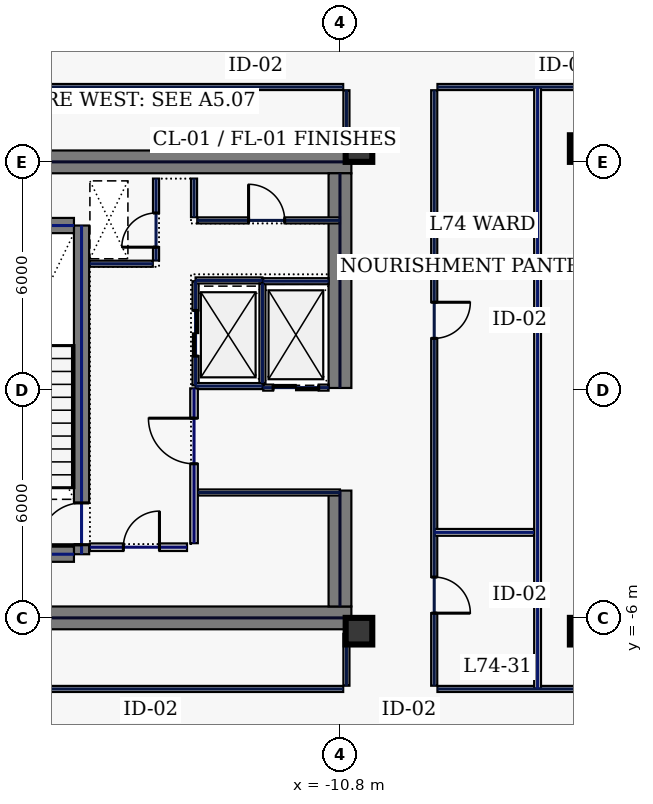
"""IFC4 building model, lengths in metres.
Left out: names, types, materials, properties, quantities, classifications, styles, units other than length and angle.
Written with IfcOpenShell. Run it as: python <this file> out.ifc"""

import sys

from ifc_helpers import new_model, si_unit, direction, frame, frame_2d, origin, origin_2d, place, context, subcontext, project, spatial, rectangle, hollow_rectangle, extrude, element, fill, save


model = new_model("IFC4")
c1 = context("Model", 3, precision=1e-05, world=origin(), true_north=direction((0.0, 1.0)))
c2 = subcontext(c1, "Body", "Model", "MODEL_VIEW")
j1 = project(units=[si_unit("LENGTHUNIT", "METRE"), si_unit("PLANEANGLEUNIT", "RADIAN")], contexts=[c1])
p1 = place(None, origin())
s1 = spatial("IfcSite", under=j1, at=p1, CompositionType="ELEMENT")
p2 = place(p1, origin())
s2 = spatial("IfcBuilding", under=s1, at=p2, CompositionType="ELEMENT")
p3 = place(p2, frame((0.0, 0.0, 317.0)))
s3 = spatial("IfcBuildingStorey", under=s2, at=p3, CompositionType="ELEMENT", Elevation=317.0)
for number, where, z_axis, x_axis in (
    (1, (-22.0, 6.0, 0.0), (0.0, 0.0, 1.0), (1.0, 0.0, 0.0)),
    (2, (-22.0, -6.0, 0.0), (0.0, 0.0, 1.0), (1.0, 0.0, 0.0)),
):
    element("IfcWall", number, at=place(p3, frame(where, z_axis=z_axis, x_axis=x_axis)), inside=s3, PredefinedType="SHEAR", context=c2, shape_type="SweptSolid", body=[
        extrude(rectangle(XDim=11.5, YDim=0.6, at=frame_2d((5.75, 0.0))), origin(), (0.0, 0.0, 1.0), 3.74),
    ])
p4 = place(p3, frame((-10.8, -5.7, 0.0), z_axis=(0.0, 0.0, 1.0), x_axis=(0.0, 1.0, 0.0)))
e3 = element("IfcWall", 3, at=p4, inside=s3, PredefinedType="SHEAR", context=c2, shape_type="SweptSolid", body=[
    extrude(rectangle(XDim=3.05, YDim=0.6, at=frame_2d((1.525, 0.0))), origin(), (0.0, 0.0, 1.0), 3.74),
])
p5 = place(p3, frame((-10.8, 0.05, 0.0), z_axis=(0.0, 0.0, 1.0), x_axis=(0.0, 1.0, 0.0)))
e4 = element("IfcWall", 4, at=p5, inside=s3, PredefinedType="SHEAR", context=c2, shape_type="SweptSolid", body=[
    extrude(rectangle(XDim=5.65, YDim=0.6, at=frame_2d((2.825, 0.0))), origin(), (0.0, 0.0, 1.0), 3.74),
])
p6 = place(p3, frame((-17.6, -4.325, 0.0), z_axis=(0.0, 0.0, 1.0), x_axis=(0.0, 1.0, 0.0)))
e5 = element("IfcWall", 5, at=p6, inside=s3, PredefinedType="SHEAR", context=c2, shape_type="SweptSolid", body=[
    extrude(rectangle(XDim=8.65, YDim=0.4, at=frame_2d((4.325, 0.0))), origin(), (0.0, 0.0, 1.0), 3.74),
])
p7 = place(p6, frame((0.25, 0.0, 0.0)))
e6 = element("IfcOpeningElement", 6, at=p7, cuts=e5, PredefinedType="OPENING", context=c2, shape_type="SweptSolid", body=[
    extrude(rectangle(XDim=1.1, YDim=2.2, at=frame_2d((0.55, 1.1))), frame((0.0, 0.21, 0.0), z_axis=(0.0, -1.0, 0.0), x_axis=(1.0, 0.0, 0.0)), (0.0, 0.0, 1.0), 0.42),
])
for number, where, z_axis, x_axis in (
    (7, (-21.2, -4.325, 0.0), (0.0, 0.0, 1.0), (1.0, 0.0, 0.0)),
    (8, (-21.2, 4.325, 0.0), (0.0, 0.0, 1.0), (1.0, 0.0, 0.0)),
):
    element("IfcWall", number, at=place(p3, frame(where, z_axis=z_axis, x_axis=x_axis)), inside=s3, PredefinedType="SHEAR", context=c2, shape_type="SweptSolid", body=[
        extrude(rectangle(XDim=3.4, YDim=0.4, at=frame_2d((1.7, 0.0))), origin(), (0.0, 0.0, 1.0), 3.74),
    ])
for number, where, z_axis, x_axis in (
    (9, (-10.3, -6.35, 0.0), (0.0, 0.0, 1.0), (1.0, 0.0, 0.0)),
    (10, (-10.3, 6.35, 0.0), (0.0, 0.0, 1.0), (1.0, 0.0, 0.0)),
    (11, (-4.4, -6.35, 0.0), (0.0, 0.0, 1.0), (1.0, 0.0, 0.0)),
    (12, (-4.4, 6.35, 0.0), (0.0, 0.0, 1.0), (1.0, 0.0, 0.0)),
):
    element("IfcColumn", number, at=place(p3, frame(where, z_axis=z_axis, x_axis=x_axis)), inside=s3, PredefinedType="COLUMN", context=c2, shape_type="SweptSolid", body=[
        extrude(hollow_rectangle(XDim=0.7, YDim=0.7, WallThickness=0.032, at=origin_2d()), origin(), (0.0, 0.0, 1.0), 3.74),
    ])
p8 = place(p3, frame((-14.6, 0.12, 0.0), z_axis=(0.0, 0.0, 1.0), x_axis=(0.0, 1.0, 0.0)))
e13 = element("IfcWall", 13, at=p8, inside=s3, PredefinedType="PARTITIONING", context=c2, shape_type="SweptSolid", body=[
    extrude(rectangle(XDim=2.74, YDim=0.16, at=frame_2d((1.37, 0.0))), origin(), (0.0, 0.0, 1.0), 3.74),
])
p9 = place(p8, frame((0.77, 0.0, 0.0)))
e14 = element("IfcOpeningElement", 14, at=p9, cuts=e13, PredefinedType="OPENING", context=c2, shape_type="SweptSolid", body=[
    extrude(rectangle(XDim=1.2, YDim=2.2, at=frame_2d((0.6, 1.1))), frame((0.0, 0.09, 0.0), z_axis=(0.0, -1.0, 0.0), x_axis=(1.0, 0.0, 0.0)), (0.0, 0.0, 1.0), 0.18),
])
for number, where, z_axis, x_axis in (
    (15, (-14.6, 0.1, 0.0), (0.0, 0.0, 1.0), (1.0, 0.0, 0.0)),
    (16, (-14.6, 2.88, 0.0), (0.0, 0.0, 1.0), (1.0, 0.0, 0.0)),
):
    element("IfcWall", number, at=place(p3, frame(where, z_axis=z_axis, x_axis=x_axis)), inside=s3, PredefinedType="PARTITIONING", context=c2, shape_type="SweptSolid", body=[
        extrude(rectangle(XDim=1.76, YDim=0.16, at=frame_2d((0.88, 0.0))), origin(), (0.0, 0.0, 1.0), 3.74),
    ])
p10 = place(p3, frame((-12.84, 0.18, 0.0), z_axis=(0.0, 0.0, 1.0), x_axis=(0.0, 1.0, 0.0)))
e17 = element("IfcWall", 17, at=p10, inside=s3, PredefinedType="PARTITIONING", context=c2, shape_type="SweptSolid", body=[
    extrude(rectangle(XDim=2.62, YDim=0.16, at=frame_2d((1.31, 0.0))), origin(), (0.0, 0.0, 1.0), 3.74),
])
p11 = place(p3, frame((-12.82, 0.06, 0.0), z_axis=(0.0, 0.0, 1.0), x_axis=(1.0, 0.0, 0.0)))
e18 = element("IfcWall", 18, at=p11, inside=s3, PredefinedType="PARTITIONING", context=c2, shape_type="SweptSolid", body=[
    extrude(rectangle(XDim=1.72, YDim=0.16, at=frame_2d((0.86, 0.0))), origin(), (0.0, 0.0, 1.0), 3.74),
])
p12 = place(p11, frame((0.26, 0.0, 0.0)))
e19 = element("IfcOpeningElement", 19, at=p12, cuts=e18, PredefinedType="OPENING", context=c2, shape_type="SweptSolid", body=[
    extrude(rectangle(XDim=1.2, YDim=2.2, at=frame_2d((0.6, 1.1))), frame((0.0, 0.09, 0.0), z_axis=(0.0, -1.0, 0.0), x_axis=(1.0, 0.0, 0.0)), (0.0, 0.0, 1.0), 0.18),
])
p13 = place(p3, frame((-12.82, 2.86, 0.0), z_axis=(0.0, 0.0, 1.0), x_axis=(1.0, 0.0, 0.0)))
e20 = element("IfcWall", 20, at=p13, inside=s3, PredefinedType="PARTITIONING", context=c2, shape_type="SweptSolid", body=[
    extrude(rectangle(XDim=1.72, YDim=0.16, at=frame_2d((0.86, 0.0))), origin(), (0.0, 0.0, 1.0), 3.74),
])
p14 = place(p3, frame((-15.64, 3.405, 0.0), z_axis=(0.0, 0.0, 1.0), x_axis=(0.0, 1.0, 0.0)))
e21 = element("IfcWall", 21, at=p14, inside=s3, PredefinedType="PARTITIONING", context=c2, shape_type="SweptSolid", body=[
    extrude(rectangle(XDim=2.155, YDim=0.16, at=frame_2d((1.078, 0.0))), origin(), (0.0, 0.0, 1.0), 3.74),
])
p15 = place(p14, frame((0.35, 0.0, 0.0)))
e22 = element("IfcOpeningElement", 22, at=p15, cuts=e21, PredefinedType="OPENING", context=c2, shape_type="SweptSolid", body=[
    extrude(rectangle(XDim=0.9, YDim=2.2, at=frame_2d((0.45, 1.1))), frame((0.0, 0.09, 0.0), z_axis=(0.0, -1.0, 0.0), x_axis=(1.0, 0.0, 0.0)), (0.0, 0.0, 1.0), 0.18),
])
p16 = place(p3, frame((-17.38, 3.32, 0.0), z_axis=(0.0, 0.0, 1.0), x_axis=(1.0, 0.0, 0.0)))
e23 = element("IfcWall", 23, at=p16, inside=s3, PredefinedType="PARTITIONING", context=c2, shape_type="SweptSolid", body=[
    extrude(rectangle(XDim=1.655, YDim=0.16, at=frame_2d((0.827, 0.0))), origin(), (0.0, 0.0, 1.0), 3.74),
])
p17 = place(p3, frame((-17.38, -4.14, 0.0), z_axis=(0.0, 0.0, 1.0), x_axis=(1.0, 0.0, 0.0)))
e24 = element("IfcWall", 24, at=p17, inside=s3, PredefinedType="SOLIDWALL", context=c2, shape_type="SweptSolid", body=[
    extrude(rectangle(XDim=2.555, YDim=0.2, at=frame_2d((1.277, 0.0))), origin(), (0.0, 0.0, 1.0), 3.74),
])
p18 = place(p17, frame((0.88, 0.0, 0.0)))
e25 = element("IfcOpeningElement", 25, at=p18, cuts=e24, PredefinedType="OPENING", context=c2, shape_type="SweptSolid", body=[
    extrude(rectangle(XDim=0.95, YDim=2.2, at=frame_2d((0.475, 1.1))), frame((0.0, 0.11, 0.0), z_axis=(0.0, -1.0, 0.0), x_axis=(1.0, 0.0, 0.0)), (0.0, 0.0, 1.0), 0.22),
])
p19 = place(p3, frame((-14.535, -2.7, 0.0), z_axis=(0.0, 0.0, 1.0), x_axis=(1.0, 0.0, 0.0)))
e26 = element("IfcWall", 26, at=p19, inside=s3, PredefinedType="PARTITIONING", context=c2, shape_type="SweptSolid", body=[
    extrude(rectangle(XDim=3.735, YDim=0.16, at=frame_2d((1.867, 0.0))), origin(), (0.0, 0.0, 1.0), 3.74),
])
p20 = place(p3, frame((-14.555, 4.46, 0.0), z_axis=(0.0, 0.0, 1.0), x_axis=(1.0, 0.0, 0.0)))
e27 = element("IfcWall", 27, at=p20, inside=s3, PredefinedType="PARTITIONING", context=c2, shape_type="SweptSolid", body=[
    extrude(rectangle(XDim=3.755, YDim=0.16, at=frame_2d((1.877, 0.0))), origin(), (0.0, 0.0, 1.0), 3.74),
])
p21 = place(p20, frame((1.35, 0.0, 0.0)))
e28 = element("IfcOpeningElement", 28, at=p21, cuts=e27, PredefinedType="OPENING", context=c2, shape_type="SweptSolid", body=[
    extrude(rectangle(XDim=0.95, YDim=2.2, at=frame_2d((0.475, 1.1))), frame((0.0, 0.09, 0.0), z_axis=(0.0, -1.0, 0.0), x_axis=(1.0, 0.0, 0.0)), (0.0, 0.0, 1.0), 0.18),
])
p22 = place(p3, frame((-14.64, 4.545, 0.0), z_axis=(0.0, 0.0, 1.0), x_axis=(0.0, 1.0, 0.0)))
e29 = element("IfcWall", 29, at=p22, inside=s3, PredefinedType="PARTITIONING", context=c2, shape_type="SweptSolid", body=[
    extrude(rectangle(XDim=1.015, YDim=0.16, at=frame_2d((0.508, 0.0))), origin(), (0.0, 0.0, 1.0), 3.74),
])
p23 = place(p3, frame((-14.64, -4.035, 0.0), z_axis=(0.0, 0.0, 1.0), x_axis=(0.0, 1.0, 0.0)))
e30 = element("IfcWall", 30, at=p23, inside=s3, PredefinedType="SOLIDWALL", context=c2, shape_type="SweptSolid", body=[
    extrude(rectangle(XDim=4.075, YDim=0.2, at=frame_2d((2.038, 0.0))), origin(), (0.0, 0.0, 1.0), 3.74),
])
p24 = place(p23, frame((2.09, 0.0, 0.0)))
e31 = element("IfcOpeningElement", 31, at=p24, cuts=e30, PredefinedType="OPENING", context=c2, shape_type="SweptSolid", body=[
    extrude(rectangle(XDim=1.2, YDim=2.2, at=frame_2d((0.6, 1.1))), frame((0.0, 0.11, 0.0), z_axis=(0.0, -1.0, 0.0), x_axis=(1.0, 0.0, 0.0)), (0.0, 0.0, 1.0), 0.22),
])
p25 = place(p3, frame((-3.965, 7.97, 0.0), z_axis=(0.0, 0.0, 1.0), x_axis=(-1.0, 0.0, 0.0)))
e32 = element("IfcWall", 32, at=p25, inside=s3, PredefinedType="PARTITIONING", context=c2, shape_type="SweptSolid", body=[
    extrude(rectangle(XDim=4.27, YDim=0.16, at=frame_2d((2.135, 0.0))), origin(), (0.0, 0.0, 1.0), 3.74),
])
p26 = place(p3, frame((-8.32, 7.885, 0.0), z_axis=(0.0, 0.0, 1.0), x_axis=(0.0, -1.0, 0.0)))
e33 = element("IfcWall", 33, at=p26, inside=s3, PredefinedType="PARTITIONING", context=c2, shape_type="SweptSolid", body=[
    extrude(rectangle(XDim=15.67, YDim=0.16, at=frame_2d((7.835, 0.0))), origin(), (0.0, 0.0, 1.0), 3.74),
])
p27 = place(p26, frame((12.811, 0.0, 0.0)))
e34 = element("IfcOpeningElement", 34, at=p27, cuts=e33, PredefinedType="OPENING", context=c2, shape_type="SweptSolid", body=[
    extrude(rectangle(XDim=0.95, YDim=2.2, at=frame_2d((0.475, 1.1))), frame((0.0, 0.09, 0.0), z_axis=(0.0, -1.0, 0.0), x_axis=(1.0, 0.0, 0.0)), (0.0, 0.0, 1.0), 0.18),
])
p28 = place(p26, frame((5.579, 0.0, 0.0)))
e35 = element("IfcOpeningElement", 35, at=p28, cuts=e33, PredefinedType="OPENING", context=c2, shape_type="SweptSolid", body=[
    extrude(rectangle(XDim=0.95, YDim=2.2, at=frame_2d((0.475, 1.1))), frame((0.0, 0.09, 0.0), z_axis=(0.0, -1.0, 0.0), x_axis=(1.0, 0.0, 0.0)), (0.0, 0.0, 1.0), 0.18),
])
p29 = place(p3, frame((-8.235, -7.87, 0.0), z_axis=(0.0, 0.0, 1.0), x_axis=(1.0, 0.0, 0.0)))
e36 = element("IfcWall", 36, at=p29, inside=s3, PredefinedType="PARTITIONING", context=c2, shape_type="SweptSolid", body=[
    extrude(rectangle(XDim=4.27, YDim=0.16, at=frame_2d((2.135, 0.0))), origin(), (0.0, 0.0, 1.0), 3.74),
])
p30 = place(p3, frame((-10.63, -7.785, 0.0), z_axis=(0.0, 0.0, 1.0), x_axis=(0.0, 1.0, 0.0)))
e37 = element("IfcWall", 37, at=p30, inside=s3, PredefinedType="PARTITIONING", context=c2, shape_type="SweptSolid", body=[
    extrude(rectangle(XDim=1.365, YDim=0.16, at=frame_2d((0.683, 0.0))), origin(), (0.0, 0.0, 1.0), 3.74),
])
p31 = place(p3, frame((-10.63, 6.42, 0.0), z_axis=(0.0, 0.0, 1.0), x_axis=(0.0, 1.0, 0.0)))
e38 = element("IfcWall", 38, at=p31, inside=s3, PredefinedType="PARTITIONING", context=c2, shape_type="SweptSolid", body=[
    extrude(rectangle(XDim=1.465, YDim=0.16, at=frame_2d((0.732, 0.0))), origin(), (0.0, 0.0, 1.0), 3.74),
])
for number, where, z_axis, x_axis in (
    (39, (-10.715, 7.97, 0.0), (0.0, 0.0, 1.0), (-1.0, 0.0, 0.0)),
    (40, (-21.915, -7.87, 0.0), (0.0, 0.0, 1.0), (1.0, 0.0, 0.0)),
):
    element("IfcWall", number, at=place(p3, frame(where, z_axis=z_axis, x_axis=x_axis)), inside=s3, PredefinedType="PARTITIONING", context=c2, shape_type="SweptSolid", body=[
        extrude(rectangle(XDim=11.2, YDim=0.16, at=frame_2d((5.6, 0.0))), origin(), (0.0, 0.0, 1.0), 3.74),
    ])
p32 = place(p3, frame((-5.6, -7.865, 0.0), z_axis=(0.0, 0.0, 1.0), x_axis=(0.0, 1.0, 0.0)))
e41 = element("IfcWall", 41, at=p32, inside=s3, PredefinedType="PARTITIONING", context=c2, shape_type="SweptSolid", body=[
    extrude(rectangle(XDim=15.83, YDim=0.18, at=frame_2d((7.915, 0.0))), origin(), (0.0, 0.0, 1.0), 3.74),
])
p33 = place(p3, frame((-8.315, -3.75, 0.0), z_axis=(0.0, 0.0, 1.0), x_axis=(1.0, 0.0, 0.0)))
e42 = element("IfcWall", 42, at=p33, inside=s3, PredefinedType="PARTITIONING", context=c2, shape_type="SweptSolid", body=[
    extrude(rectangle(XDim=2.62, YDim=0.18, at=frame_2d((1.31, 0.0))), origin(), (0.0, 0.0, 1.0), 3.74),
])
p34 = place(p7, origin())
e43 = element("IfcDoor", 43, at=p34, inside=s3, OperationType="SINGLE_SWING_LEFT", PredefinedType="DOOR", context=c2, shape_type="SweptSolid", body=[
    extrude(rectangle(XDim=1.1, YDim=2.2, at=frame_2d((0.55, 1.1))), frame((0.0, 0.025, 0.0), z_axis=(0.0, -1.0, 0.0), x_axis=(1.0, 0.0, 0.0)), (0.0, 0.0, 1.0), 0.05),
])
fill(e6, e43)
p35 = place(p9, origin())
e44 = element("IfcDoor", 44, at=p35, inside=s3, OperationType="SLIDING_TO_LEFT", PredefinedType="DOOR", context=c2, shape_type="SweptSolid", body=[
    extrude(rectangle(XDim=1.2, YDim=2.2, at=frame_2d((0.6, 1.1))), frame((0.0, 0.025, 0.0), z_axis=(0.0, -1.0, 0.0), x_axis=(1.0, 0.0, 0.0)), (0.0, 0.0, 1.0), 0.05),
])
fill(e14, e44)
p36 = place(p12, origin())
e45 = element("IfcDoor", 45, at=p36, inside=s3, OperationType="SLIDING_TO_LEFT", PredefinedType="DOOR", context=c2, shape_type="SweptSolid", body=[
    extrude(rectangle(XDim=1.2, YDim=2.2, at=frame_2d((0.6, 1.1))), frame((0.0, 0.025, 0.0), z_axis=(0.0, -1.0, 0.0), x_axis=(1.0, 0.0, 0.0)), (0.0, 0.0, 1.0), 0.05),
])
fill(e19, e45)
p37 = place(p15, origin())
e46 = element("IfcDoor", 46, at=p37, inside=s3, OperationType="SINGLE_SWING_LEFT", PredefinedType="DOOR", context=c2, shape_type="SweptSolid", body=[
    extrude(rectangle(XDim=0.9, YDim=2.2, at=frame_2d((0.45, 1.1))), frame((0.0, 0.025, 0.0), z_axis=(0.0, -1.0, 0.0), x_axis=(1.0, 0.0, 0.0)), (0.0, 0.0, 1.0), 0.05),
])
fill(e22, e46)
p38 = place(p18, origin())
e47 = element("IfcDoor", 47, at=p38, inside=s3, OperationType="SINGLE_SWING_RIGHT", PredefinedType="DOOR", context=c2, shape_type="SweptSolid", body=[
    extrude(rectangle(XDim=0.95, YDim=2.2, at=frame_2d((0.475, 1.1))), frame((0.0, 0.025, 0.0), z_axis=(0.0, -1.0, 0.0), x_axis=(1.0, 0.0, 0.0)), (0.0, 0.0, 1.0), 0.05),
])
fill(e25, e47)
p39 = place(p21, origin())
e48 = element("IfcDoor", 48, at=p39, inside=s3, OperationType="SINGLE_SWING_LEFT", PredefinedType="DOOR", context=c2, shape_type="SweptSolid", body=[
    extrude(rectangle(XDim=0.95, YDim=2.2, at=frame_2d((0.475, 1.1))), frame((0.0, 0.025, 0.0), z_axis=(0.0, -1.0, 0.0), x_axis=(1.0, 0.0, 0.0)), (0.0, 0.0, 1.0), 0.05),
])
fill(e28, e48)
p40 = place(p24, origin())
e49 = element("IfcDoor", 49, at=p40, inside=s3, OperationType="SINGLE_SWING_RIGHT", PredefinedType="DOOR", context=c2, shape_type="SweptSolid", body=[
    extrude(rectangle(XDim=1.2, YDim=2.2, at=frame_2d((0.6, 1.1))), frame((0.0, 0.025, 0.0), z_axis=(0.0, -1.0, 0.0), x_axis=(1.0, 0.0, 0.0)), (0.0, 0.0, 1.0), 0.05),
])
fill(e31, e49)
p41 = place(p27, origin())
e50 = element("IfcDoor", 50, at=p41, inside=s3, OperationType="SINGLE_SWING_RIGHT", PredefinedType="DOOR", context=c2, shape_type="SweptSolid", body=[
    extrude(rectangle(XDim=0.95, YDim=2.2, at=frame_2d((0.475, 1.1))), frame((0.0, 0.025, 0.0), z_axis=(0.0, -1.0, 0.0), x_axis=(1.0, 0.0, 0.0)), (0.0, 0.0, 1.0), 0.05),
])
fill(e34, e50)
p42 = place(p28, origin())
e51 = element("IfcDoor", 51, at=p42, inside=s3, OperationType="SINGLE_SWING_LEFT", PredefinedType="DOOR", context=c2, shape_type="SweptSolid", body=[
    extrude(rectangle(XDim=0.95, YDim=2.2, at=frame_2d((0.475, 1.1))), frame((0.0, 0.025, 0.0), z_axis=(0.0, -1.0, 0.0), x_axis=(1.0, 0.0, 0.0)), (0.0, 0.0, 1.0), 0.05),
])
fill(e35, e51)
save(model, sys.argv[1])
